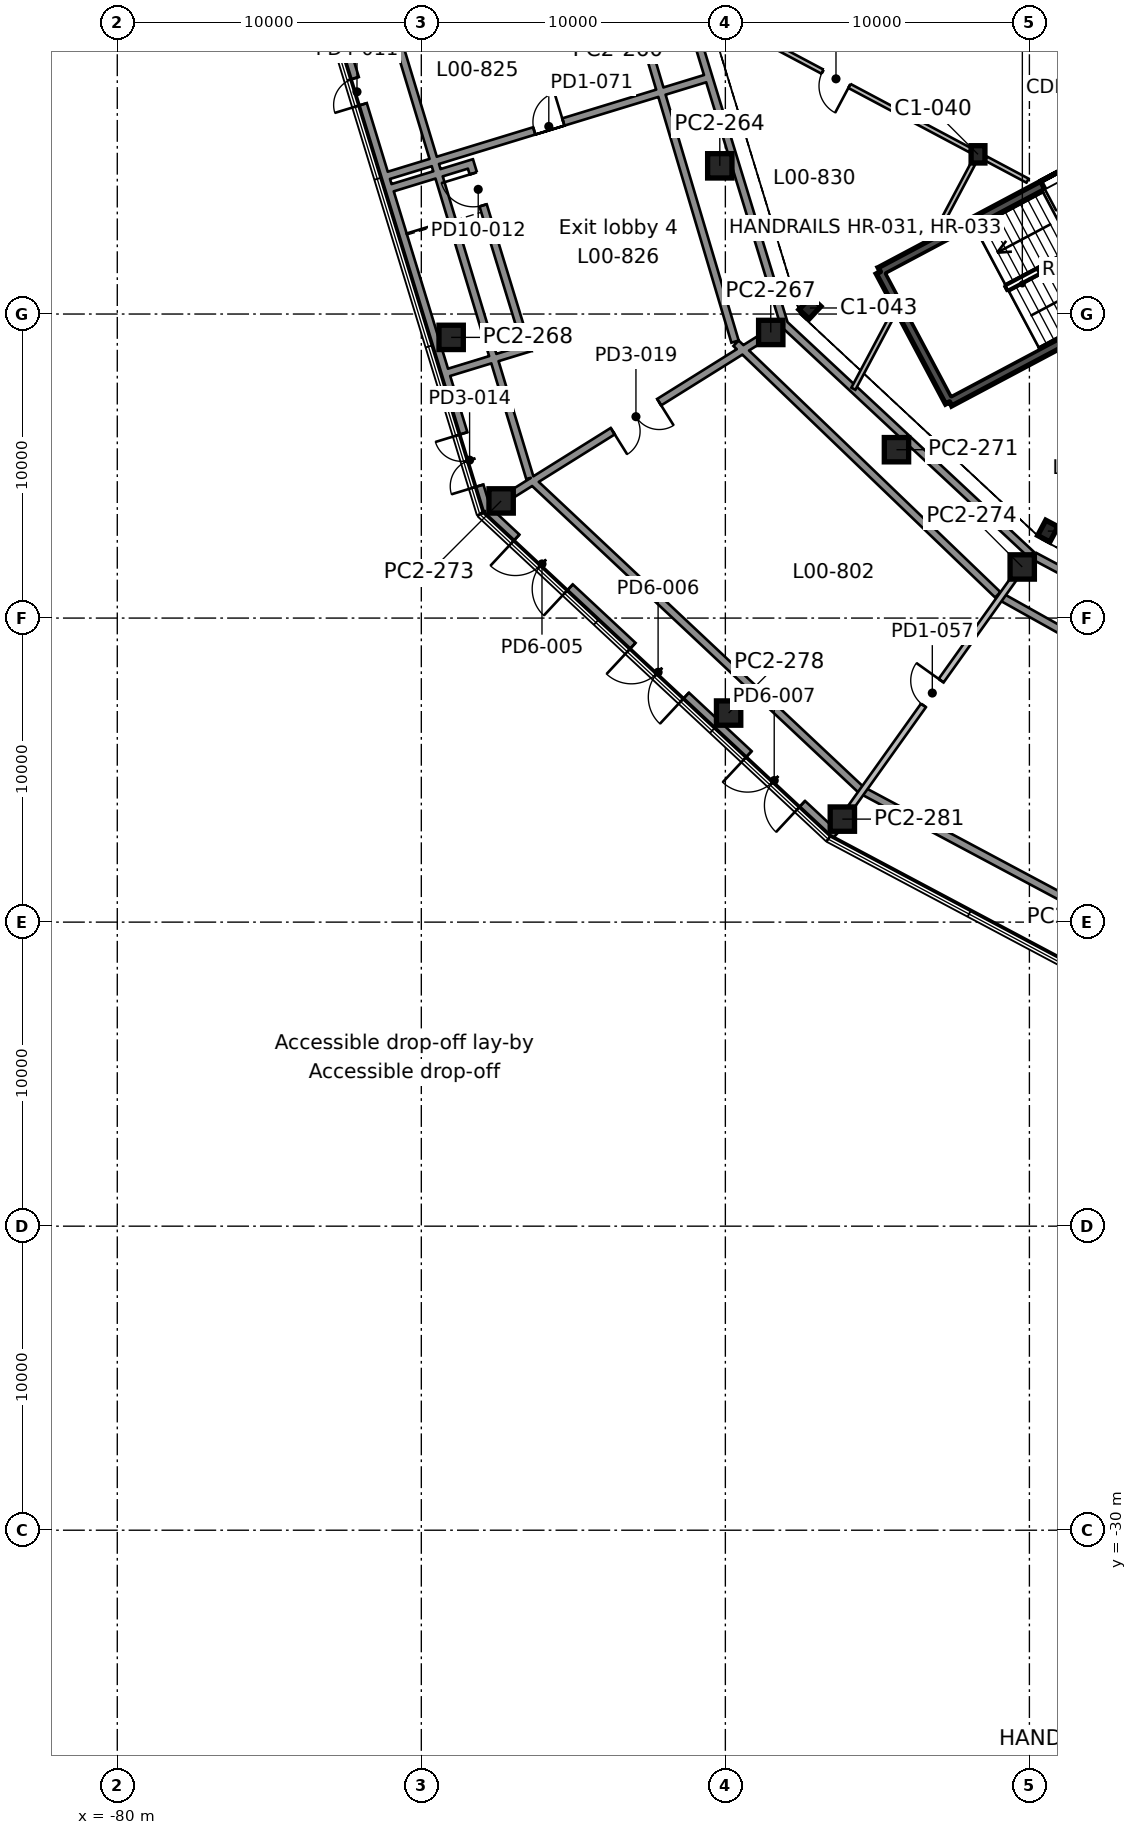
"""IFC4 building model, lengths in metres.
Left out: names, types, materials, properties, quantities, classifications, styles, units other than length and angle.
Written with IfcOpenShell. Run it as: python <this file> out.ifc"""

import sys

from ifc_helpers import new_model, si_unit, direction, frame, frame_2d, origin, origin_2d, place, context, subcontext, project, spatial, rectangle, i_section, extrude, element, fill, save


model = new_model("IFC4")
c1 = context("Model", 3, precision=1e-05, world=origin(), true_north=direction((0.0, 1.0)))
c2 = subcontext(c1, "Body", "Model", "MODEL_VIEW")
j1 = project(units=[si_unit("LENGTHUNIT", "METRE"), si_unit("PLANEANGLEUNIT", "RADIAN")], contexts=[c1])
p1 = place(None, origin())
s1 = spatial("IfcSite", under=j1, at=p1, CompositionType="ELEMENT")
p2 = place(p1, origin())
s2 = spatial("IfcBuilding", under=s1, at=p2, CompositionType="ELEMENT")
p3 = place(p2, origin())
s3 = spatial("IfcBuildingStorey", under=s2, at=p3, CompositionType="ELEMENT", Elevation=0.0)
for number, where, z_axis, x_axis in (
    (1, (-49.394, 2.861, 0.0), (0.0, 0.0, 1.0), (0.883, -0.469, 0.0)),
    (2, (-57.219, 10.199, 0.0), (0.0, 0.0, 1.0), (0.731, -0.682, 0.0)),
    (3, (-51.69, 15.252, 0.0), (0.0, 0.0, 1.0), (1.0, 0.0, 0.0)),
):
    element("IfcColumn", number, at=place(p3, frame(where, z_axis=z_axis, x_axis=x_axis)), inside=s3, PredefinedType="COLUMN", context=c2, shape_type="SweptSolid", body=[
        extrude(i_section(OverallWidth=0.455, OverallDepth=0.569, WebThickness=0.078, FlangeThickness=0.125, FilletRadius=0.015, at=origin_2d()), origin(), (0.0, 0.0, 1.0), 7.0),
    ])
p4 = place(p3, frame((-45.297, 11.007, 0.0), z_axis=(0.0, 0.0, 1.0), x_axis=(-0.882951519127, -0.469464178475, 0.0)))
e4 = element("IfcWall", 4, at=p4, inside=s3, PredefinedType="SHEAR", context=c2, shape_type="SweptSolid", body=[
    extrude(rectangle(XDim=8.3, YDim=0.3, at=frame_2d((4.15, 0.0))), origin(), (0.0, 0.0, 1.0), 7.0),
])
p5 = place(p3, frame((-52.626, 7.111, 0.0), z_axis=(0.0, 0.0, 1.0), x_axis=(-0.469464364128, 0.882951420416, 0.0)))
e5 = element("IfcWall", 5, at=p5, inside=s3, PredefinedType="SHEAR", context=c2, shape_type="SweptSolid", body=[
    extrude(rectangle(XDim=4.85, YDim=0.3, at=frame_2d((2.425, 0.0))), origin(), (0.0, 0.0, 1.0), 7.0),
])
p6 = place(p3, frame((-54.903, 11.393, 0.0), z_axis=(0.0, 0.0, 1.0), x_axis=(0.882939326045, 0.469487110071, 0.0)))
e6 = element("IfcWall", 6, at=p6, inside=s3, PredefinedType="SHEAR", context=c2, shape_type="SweptSolid", body=[
    extrude(rectangle(XDim=8.3, YDim=0.3, at=frame_2d((4.15, 0.0))), origin(), (0.0, 0.0, 1.0), 7.0),
])
p7 = place(p6, frame((6.05, 0.0, 0.0)))
e7 = element("IfcOpeningElement", 7, at=p7, cuts=e6, PredefinedType="OPENING", context=c2, shape_type="SweptSolid", body=[
    extrude(rectangle(XDim=1.9, YDim=2.1, at=frame_2d((0.95, 1.05))), frame((0.0, 0.16, 0.0), z_axis=(0.0, -1.0, 0.0), x_axis=(1.0, 0.0, 0.0)), (0.0, 0.0, 1.0), 0.32),
])
for number, where, z_axis, x_axis in (
    (8, (-56.152, -6.612, 0.0), (0.0, 0.0, 1.0), (1.0, 0.0, 0.0)),
    (9, (-59.893, -3.124, 0.0), (0.0, 0.0, 1.0), (1.0, 0.0, 0.0)),
    (10, (-50.236, 1.681, 0.0), (0.0, 0.0, 1.0), (1.0, 0.0, 0.0)),
    (11, (-67.375, 3.853, 0.0), (0.0, 0.0, 1.0), (1.0, 0.0, 0.0)),
    (12, (-54.372, 5.538, 0.0), (0.0, 0.0, 1.0), (1.0, 0.0, 0.0)),
    (13, (-69.019, 9.232, 0.0), (0.0, 0.0, 1.0), (1.0, 0.0, 0.0)),
    (14, (-58.507, 9.394, 0.0), (0.0, 0.0, 1.0), (1.0, 0.0, 0.0)),
    (15, (-60.183, 14.874, 0.0), (0.0, 0.0, 1.0), (1.0, 0.0, 0.0)),
):
    element("IfcColumn", number, at=place(p3, frame(where, z_axis=z_axis, x_axis=x_axis)), inside=s3, PredefinedType="COLUMN", context=c2, shape_type="SweptSolid", body=[
        extrude(rectangle(XDim=0.8, YDim=0.8, at=origin_2d()), origin(), (0.0, 0.0, 1.0), 6.37),
    ])
p8 = place(p3, frame((-72.929, 19.967, 0.0), z_axis=(0.0, 0.0, 1.0), x_axis=(0.292376176059, -0.956303388927, 0.0)))
e16 = element("IfcWall", 16, at=p8, inside=s3, PredefinedType="SOLIDWALL", context=c2, shape_type="SweptSolid", body=[
    extrude(rectangle(XDim=17.194, YDim=0.4, at=frame_2d((8.597, 0.0))), origin(), (0.0, 0.0, 1.0), 6.37),
])
p9 = place(p8, frame((2.33, 0.0, 0.0)))
e17 = element("IfcOpeningElement", 17, at=p9, cuts=e16, PredefinedType="OPENING", context=c2, shape_type="SweptSolid", body=[
    extrude(rectangle(XDim=0.9, YDim=2.1, at=frame_2d((0.45, 1.05))), frame((0.0, 0.21, 0.0), z_axis=(0.0, -1.0, 0.0), x_axis=(1.0, 0.0, 0.0)), (0.0, 0.0, 1.0), 0.42),
])
p10 = place(p8, frame((14.548, 0.0, 0.0)))
e18 = element("IfcOpeningElement", 18, at=p10, cuts=e16, PredefinedType="OPENING", context=c2, shape_type="SweptSolid", body=[
    extrude(rectangle(XDim=1.8, YDim=2.1, at=frame_2d((0.9, 1.05))), frame((0.0, 0.21, 0.0), z_axis=(0.0, -1.0, 0.0), x_axis=(1.0, 0.0, 0.0)), (0.0, 0.0, 1.0), 0.42),
])
p11 = place(p3, frame((-67.902, 3.524, 0.0), z_axis=(0.0, 0.0, 1.0), x_axis=(0.731345713801, -0.682006925848, 0.0)))
e19 = element("IfcWall", 19, at=p11, inside=s3, PredefinedType="SOLIDWALL", context=c2, shape_type="SweptSolid", body=[
    extrude(rectangle(XDim=15.706, YDim=0.4, at=frame_2d((7.853, 0.0))), origin(), (0.0, 0.0, 1.0), 6.37),
])
p12 = place(p11, frame((1.357, 0.0, 0.0)))
e20 = element("IfcOpeningElement", 20, at=p12, cuts=e19, PredefinedType="OPENING", context=c2, shape_type="SweptSolid", body=[
    extrude(rectangle(XDim=2.4, YDim=2.4, at=frame_2d((1.2, 1.2))), frame((0.0, 0.21, 0.0), z_axis=(0.0, -1.0, 0.0), x_axis=(1.0, 0.0, 0.0)), (0.0, 0.0, 1.0), 0.42),
])
p13 = place(p11, frame((6.579, 0.0, 0.0)))
e21 = element("IfcOpeningElement", 21, at=p13, cuts=e19, PredefinedType="OPENING", context=c2, shape_type="SweptSolid", body=[
    extrude(rectangle(XDim=2.4, YDim=2.4, at=frame_2d((1.2, 1.2))), frame((0.0, 0.21, 0.0), z_axis=(0.0, -1.0, 0.0), x_axis=(1.0, 0.0, 0.0)), (0.0, 0.0, 1.0), 0.42),
])
p14 = place(p11, frame((11.801, 0.0, 0.0)))
e22 = element("IfcOpeningElement", 22, at=p14, cuts=e19, PredefinedType="OPENING", context=c2, shape_type="SweptSolid", body=[
    extrude(rectangle(XDim=2.4, YDim=2.4, at=frame_2d((1.2, 1.2))), frame((0.0, 0.21, 0.0), z_axis=(0.0, -1.0, 0.0), x_axis=(1.0, 0.0, 0.0)), (0.0, 0.0, 1.0), 0.42),
])
p15 = place(p3, frame((-48.784, -9.255, 7.0), z_axis=(0.0, 0.0, 1.0), x_axis=(-0.882115498976, 0.471033169178, 0.0)))
e23 = element("IfcWall", 23, at=p15, inside=s3, PredefinedType="STANDARD", context=c2, shape_type="SweptSolid", body=[
    extrude(rectangle(XDim=7.632, YDim=0.25, at=frame_2d((3.816, 0.0))), origin(), (0.0, 0.0, 1.0), 0.65),
])
p16 = place(p3, frame((-55.543, -5.642, 7.0), z_axis=(0.0, 0.0, 1.0), x_axis=(-0.728908334125, 0.684611306102, 0.0)))
e24 = element("IfcWall", 24, at=p16, inside=s3, PredefinedType="STANDARD", context=c2, shape_type="SweptSolid", body=[
    extrude(rectangle(XDim=14.886, YDim=0.25, at=frame_2d((7.443, 0.0))), origin(), (0.0, 0.0, 1.0), 0.65),
])
p17 = place(p3, frame((-66.428, 4.605, 7.0), z_axis=(0.0, 0.0, 1.0), x_axis=(-0.289217899345, 0.957263290166, 0.0)))
e25 = element("IfcWall", 25, at=p17, inside=s3, PredefinedType="STANDARD", context=c2, shape_type="SweptSolid", body=[
    extrude(rectangle(XDim=16.189, YDim=0.25, at=frame_2d((8.094, 0.0))), origin(), (0.0, 0.0, 1.0), 0.65),
])
p18 = place(p3, frame((-63.039, 20.385, 7.0), z_axis=(0.0, 0.0, 1.0), x_axis=(0.284972326549, -0.9585357443, 0.0)))
e26 = element("IfcWall", 26, at=p18, inside=s3, PredefinedType="STANDARD", context=c2, shape_type="SweptSolid", body=[
    extrude(rectangle(XDim=11.781, YDim=0.25, at=frame_2d((5.89, 0.0))), origin(), (0.0, 0.0, 1.0), 0.65),
])
p19 = place(p3, frame((-59.649, 9.039, 7.0), z_axis=(0.0, 0.0, 1.0), x_axis=(0.721064848091, -0.692867581034, 0.0)))
e27 = element("IfcWall", 27, at=p19, inside=s3, PredefinedType="STANDARD", context=c2, shape_type="SweptSolid", body=[
    extrude(rectangle(XDim=11.94, YDim=0.25, at=frame_2d((5.97, 0.0))), origin(), (0.0, 0.0, 1.0), 0.65),
])
p20 = place(p3, frame((-51.014, 0.747, 7.0), z_axis=(0.0, 0.0, 1.0), x_axis=(0.872584878438, -0.488462516394, 0.0)))
e28 = element("IfcWall", 28, at=p20, inside=s3, PredefinedType="STANDARD", context=c2, shape_type="SweptSolid", body=[
    extrude(rectangle(XDim=6.809, YDim=0.25, at=frame_2d((3.405, 0.0))), origin(), (0.0, 0.0, 1.0), 0.65),
])
p21 = place(p3, frame((-71.067, 14.562, 0.0), z_axis=(0.0, 0.0, 1.0), x_axis=(0.956304866869, 0.292371341965, 0.0)))
e29 = element("IfcWall", 29, at=p21, inside=s3, PredefinedType="SOLIDWALL", context=c2, shape_type="SweptSolid", body=[
    extrude(rectangle(XDim=11.0, YDim=0.25, at=frame_2d((5.5, 0.0))), origin(), (0.0, 0.0, 1.0), 6.37),
])
p22 = place(p21, frame((5.0, 0.0, 0.0)))
e30 = element("IfcOpeningElement", 30, at=p22, cuts=e29, PredefinedType="OPENING", context=c2, shape_type="SweptSolid", body=[
    extrude(rectangle(XDim=1.0, YDim=2.1, at=frame_2d((0.5, 1.05))), frame((0.0, 0.135, 0.0), z_axis=(0.0, -1.0, 0.0), x_axis=(1.0, 0.0, 0.0)), (0.0, 0.0, 1.0), 0.27),
])
p23 = place(p3, frame((-60.549, 17.783, 0.0), z_axis=(0.0, 0.0, 1.0), x_axis=(-0.291634808329, 0.956529737421, 0.0)))
e31 = element("IfcWall", 31, at=p23, inside=s3, PredefinedType="SOLIDWALL", context=c2, shape_type="SweptSolid", body=[
    extrude(rectangle(XDim=2.71, YDim=0.25, at=frame_2d((1.355, 0.0))), origin(), (0.0, 0.0, 1.0), 6.37),
])
p24 = place(p3, frame((-58.065, 9.666, 0.0), z_axis=(0.0, 0.0, 1.0), x_axis=(-0.292613894095, 0.956230677704, 0.0)))
e32 = element("IfcWall", 32, at=p24, inside=s3, PredefinedType="SOLIDWALL", context=c2, shape_type="SweptSolid", body=[
    extrude(rectangle(XDim=8.487, YDim=0.25, at=frame_2d((4.244, 0.0))), origin(), (0.0, 0.0, 1.0), 6.37),
])
p25 = place(p3, frame((-66.975, 4.103, 0.0), z_axis=(0.0, 0.0, 1.0), x_axis=(0.848048758951, 0.529918203539, 0.0)))
e33 = element("IfcWall", 33, at=p25, inside=s3, PredefinedType="SOLIDWALL", context=c2, shape_type="SweptSolid", body=[
    extrude(rectangle(XDim=9.514, YDim=0.25, at=frame_2d((4.757, 0.0))), origin(), (0.0, 0.0, 1.0), 6.37),
])
p26 = place(p25, frame((3.857, 0.0, 0.0)))
e34 = element("IfcOpeningElement", 34, at=p26, cuts=e33, PredefinedType="OPENING", context=c2, shape_type="SweptSolid", body=[
    extrude(rectangle(XDim=1.8, YDim=2.1, at=frame_2d((0.9, 1.05))), frame((0.0, 0.135, 0.0), z_axis=(0.0, -1.0, 0.0), x_axis=(1.0, 0.0, 0.0)), (0.0, 0.0, 1.0), 0.27),
])
p27 = place(p3, frame((-47.224, 0.646, 0.0), z_axis=(0.0, 0.0, 1.0), x_axis=(-0.882766080441, 0.469812778905, 0.0)))
e35 = element("IfcWall", 35, at=p27, inside=s3, PredefinedType="SOLIDWALL", context=c2, shape_type="SweptSolid", body=[
    extrude(rectangle(XDim=2.958, YDim=0.25, at=frame_2d((1.479, 0.0))), origin(), (0.0, 0.0, 1.0), 6.37),
])
p28 = place(p3, frame((-50.521, 1.281, 0.0), z_axis=(0.0, 0.0, 1.0), x_axis=(-0.580708624763, -0.814111474631, 0.0)))
e36 = element("IfcWall", 36, at=p28, inside=s3, PredefinedType="PARTITIONING", context=c2, shape_type="SweptSolid", body=[
    extrude(rectangle(XDim=9.204, YDim=0.2, at=frame_2d((4.602, 0.0))), origin(), (0.0, 0.0, 1.0), 6.37),
])
p29 = place(p28, frame((4.102, 0.0, 0.0)))
e37 = element("IfcOpeningElement", 37, at=p29, cuts=e36, PredefinedType="OPENING", context=c2, shape_type="SweptSolid", body=[
    extrude(rectangle(XDim=1.0, YDim=2.1, at=frame_2d((0.5, 1.05))), frame((0.0, 0.11, 0.0), z_axis=(0.0, -1.0, 0.0), x_axis=(1.0, 0.0, 0.0)), (0.0, 0.0, 1.0), 0.22),
])
p30 = place(p3, frame((-51.427, 15.113, 0.0), z_axis=(0.0, 0.0, 1.0), x_axis=(0.882911356804, -0.469539706549, 0.0)))
e38 = element("IfcWall", 38, at=p30, inside=s3, PredefinedType="PARTITIONING", context=c2, shape_type="SweptSolid", body=[
    extrude(rectangle(XDim=1.547, YDim=0.15, at=frame_2d((0.774, 0.0))), origin(), (0.0, 0.0, 1.0), 6.55),
])
p31 = place(p3, frame((-60.632, 20.007, 0.0), z_axis=(0.0, 0.0, 1.0), x_axis=(0.882940733586, -0.469484462975, 0.0)))
e39 = element("IfcWall", 39, at=p31, inside=s3, PredefinedType="PARTITIONING", context=c2, shape_type="SweptSolid", body=[
    extrude(rectangle(XDim=9.83, YDim=0.15, at=frame_2d((4.915, 0.0))), origin(), (0.0, 0.0, 1.0), 6.55),
])
p32 = place(p31, frame((4.337, 0.0, 0.0)))
e40 = element("IfcOpeningElement", 40, at=p32, cuts=e39, PredefinedType="OPENING", context=c2, shape_type="SweptSolid", body=[
    extrude(rectangle(XDim=1.0, YDim=2.1, at=frame_2d((0.5, 1.05))), frame((0.0, 0.085, 0.0), z_axis=(0.0, -1.0, 0.0), x_axis=(1.0, 0.0, 0.0)), (0.0, 0.0, 1.0), 0.17),
])
p33 = place(p3, frame((-51.858, 14.936, 0.0), z_axis=(0.0, 0.0, 1.0), x_axis=(-0.469439381141, -0.882964703391, 0.0)))
e41 = element("IfcWall", 41, at=p33, inside=s3, PredefinedType="PARTITIONING", context=c2, shape_type="SweptSolid", body=[
    extrude(rectangle(XDim=2.659, YDim=0.15, at=frame_2d((1.33, 0.0))), origin(), (0.0, 0.0, 1.0), 6.55),
])
p34 = place(p3, frame((-54.431, 10.097, 0.0), z_axis=(0.0, 0.0, 1.0), x_axis=(-0.46949257756, -0.882936418784, 0.0)))
e42 = element("IfcWall", 42, at=p34, inside=s3, PredefinedType="PARTITIONING", context=c2, shape_type="SweptSolid", body=[
    extrude(rectangle(XDim=2.892, YDim=0.15, at=frame_2d((1.446, 0.0))), origin(), (0.0, 0.0, 1.0), 6.55),
])
p35 = place(p3, frame((-55.785, 7.539, 0.0), z_axis=(0.0, 0.0, 1.0), x_axis=(0.731373339026, -0.681977300914, 0.0)))
e43 = element("IfcWall", 43, at=p35, inside=s3, PredefinedType="SOLIDWALL", context=c2, shape_type="SweptSolid", body=[
    extrude(rectangle(XDim=2.348, YDim=0.25, at=frame_2d((1.174, 0.0))), origin(), (0.0, 0.0, 1.0), 6.37),
])
p36 = place(p3, frame((-53.972, 5.849, 0.0), z_axis=(0.0, 0.0, 1.0), x_axis=(0.731317536597, -0.682037140239, 0.0)))
e44 = element("IfcWall", 44, at=p36, inside=s3, PredefinedType="SOLIDWALL", context=c2, shape_type="SweptSolid", body=[
    extrude(rectangle(XDim=5.509, YDim=0.25, at=frame_2d((2.754, 0.0))), origin(), (0.0, 0.0, 1.0), 6.37),
])
p37 = place(p3, frame((-58.068, 9.669, 0.0), z_axis=(0.0, 0.0, 1.0), x_axis=(0.731356961262, -0.681994864507, 0.0)))
e45 = element("IfcWall", 45, at=p37, inside=s3, PredefinedType="SOLIDWALL", context=c2, shape_type="SweptSolid", body=[
    extrude(rectangle(XDim=3.121, YDim=0.25, at=frame_2d((1.561, 0.0))), origin(), (0.0, 0.0, 1.0), 6.37),
])
for number, where, z_axis, x_axis in (
    (46, (-70.943, 14.155, 0.0), (0.0, 0.0, 1.0), (0.956, 0.292, 0.0)),
    (47, (-69.086, 8.083, 0.0), (0.0, 0.0, 1.0), (0.956, 0.292, 0.0)),
):
    element("IfcWall", number, at=place(p3, frame(where, z_axis=z_axis, x_axis=x_axis)), inside=s3, PredefinedType="SOLIDWALL", context=c2, shape_type="SweptSolid", body=[
        extrude(rectangle(XDim=2.8, YDim=0.25, at=frame_2d((1.4, 0.0))), origin(), (0.0, 0.0, 1.0), 6.37),
    ])
p38 = place(p3, frame((-68.421, 15.057, 0.0), z_axis=(0.0, 0.0, 1.0), x_axis=(0.292369833763, -0.956305327971, 0.0)))
e48 = element("IfcWall", 48, at=p38, inside=s3, PredefinedType="SOLIDWALL", context=c2, shape_type="SweptSolid", body=[
    extrude(rectangle(XDim=6.6, YDim=0.25, at=frame_2d((3.3, 0.0))), origin(), (0.0, 0.0, 1.0), 6.37),
])
p39 = place(p38, frame((0.45, 0.0, 0.0)))
e49 = element("IfcOpeningElement", 49, at=p39, cuts=e48, PredefinedType="OPENING", context=c2, shape_type="SweptSolid", body=[
    extrude(rectangle(XDim=1.1, YDim=2.1, at=frame_2d((0.55, 1.05))), frame((0.0, 0.135, 0.0), z_axis=(0.0, -1.0, 0.0), x_axis=(1.0, 0.0, 0.0)), (0.0, 0.0, 1.0), 0.27),
])
p40 = place(p7, frame((1.9, 0.0, 0.0), z_axis=(0.0, 0.0, 1.0), x_axis=(-1.0, 0.0, 0.0)))
e50 = element("IfcDoor", 50, at=p40, inside=s3, OperationType="DOUBLE_DOOR_SINGLE_SWING", PredefinedType="DOOR", context=c2, shape_type="SweptSolid", body=[
    extrude(rectangle(XDim=1.9, YDim=2.1, at=frame_2d((0.95, 1.05))), frame((0.0, 0.025, 0.0), z_axis=(0.0, -1.0, 0.0), x_axis=(1.0, 0.0, 0.0)), (0.0, 0.0, 1.0), 0.05),
])
fill(e7, e50)
p41 = place(p9, frame((0.9, 0.0, 0.0), z_axis=(0.0, 0.0, 1.0), x_axis=(-1.0, 0.0, 0.0)))
e51 = element("IfcDoor", 51, at=p41, inside=s3, OperationType="SINGLE_SWING_LEFT", PredefinedType="DOOR", context=c2, shape_type="SweptSolid", body=[
    extrude(rectangle(XDim=0.9, YDim=2.1, at=frame_2d((0.45, 1.05))), frame((0.0, 0.025, 0.0), z_axis=(0.0, -1.0, 0.0), x_axis=(1.0, 0.0, 0.0)), (0.0, 0.0, 1.0), 0.05),
])
fill(e17, e51)
p42 = place(p10, frame((1.8, 0.0, 0.0), z_axis=(0.0, 0.0, 1.0), x_axis=(-1.0, 0.0, 0.0)))
e52 = element("IfcDoor", 52, at=p42, inside=s3, OperationType="DOUBLE_DOOR_SINGLE_SWING", PredefinedType="DOOR", context=c2, shape_type="SweptSolid", body=[
    extrude(rectangle(XDim=1.8, YDim=2.1, at=frame_2d((0.9, 1.05))), frame((0.0, 0.025, 0.0), z_axis=(0.0, -1.0, 0.0), x_axis=(1.0, 0.0, 0.0)), (0.0, 0.0, 1.0), 0.05),
])
fill(e18, e52)
p43 = place(p12, frame((2.4, 0.0, 0.0), z_axis=(0.0, 0.0, 1.0), x_axis=(-1.0, 0.0, 0.0)))
e53 = element("IfcDoor", 53, at=p43, inside=s3, OperationType="DOUBLE_DOOR_SINGLE_SWING", PredefinedType="DOOR", context=c2, shape_type="SweptSolid", body=[
    extrude(rectangle(XDim=2.4, YDim=2.4, at=frame_2d((1.2, 1.2))), frame((0.0, 0.025, 0.0), z_axis=(0.0, -1.0, 0.0), x_axis=(1.0, 0.0, 0.0)), (0.0, 0.0, 1.0), 0.05),
])
fill(e20, e53)
p44 = place(p13, frame((2.4, 0.0, 0.0), z_axis=(0.0, 0.0, 1.0), x_axis=(-1.0, 0.0, 0.0)))
e54 = element("IfcDoor", 54, at=p44, inside=s3, OperationType="DOUBLE_DOOR_SINGLE_SWING", PredefinedType="DOOR", context=c2, shape_type="SweptSolid", body=[
    extrude(rectangle(XDim=2.4, YDim=2.4, at=frame_2d((1.2, 1.2))), frame((0.0, 0.025, 0.0), z_axis=(0.0, -1.0, 0.0), x_axis=(1.0, 0.0, 0.0)), (0.0, 0.0, 1.0), 0.05),
])
fill(e21, e54)
p45 = place(p14, frame((2.4, 0.0, 0.0), z_axis=(0.0, 0.0, 1.0), x_axis=(-1.0, 0.0, 0.0)))
e55 = element("IfcDoor", 55, at=p45, inside=s3, OperationType="DOUBLE_DOOR_SINGLE_SWING", PredefinedType="DOOR", context=c2, shape_type="SweptSolid", body=[
    extrude(rectangle(XDim=2.4, YDim=2.4, at=frame_2d((1.2, 1.2))), frame((0.0, 0.025, 0.0), z_axis=(0.0, -1.0, 0.0), x_axis=(1.0, 0.0, 0.0)), (0.0, 0.0, 1.0), 0.05),
])
fill(e22, e55)
p46 = place(p39, frame((1.1, 0.0, 0.0), z_axis=(0.0, 0.0, 1.0), x_axis=(-1.0, 0.0, 0.0)))
e56 = element("IfcDoor", 56, at=p46, inside=s3, OperationType="SINGLE_SWING_RIGHT", PredefinedType="DOOR", context=c2, shape_type="SweptSolid", body=[
    extrude(rectangle(XDim=1.1, YDim=2.1, at=frame_2d((0.55, 1.05))), frame((0.0, 0.025, 0.0), z_axis=(0.0, -1.0, 0.0), x_axis=(1.0, 0.0, 0.0)), (0.0, 0.0, 1.0), 0.05),
])
fill(e49, e56)
p47 = place(p32, frame((1.0, 0.0, 0.0), z_axis=(0.0, 0.0, 1.0), x_axis=(-1.0, 0.0, 0.0)))
e57 = element("IfcDoor", 57, at=p47, inside=s3, OperationType="SINGLE_SWING_LEFT", PredefinedType="DOOR", context=c2, shape_type="SweptSolid", body=[
    extrude(rectangle(XDim=1.0, YDim=2.1, at=frame_2d((0.5, 1.05))), frame((0.0, 0.025, 0.0), z_axis=(0.0, -1.0, 0.0), x_axis=(1.0, 0.0, 0.0)), (0.0, 0.0, 1.0), 0.05),
])
fill(e40, e57)
p48 = place(p26, frame((1.8, 0.0, 0.0), z_axis=(0.0, 0.0, 1.0), x_axis=(-1.0, 0.0, 0.0)))
e58 = element("IfcDoor", 58, at=p48, inside=s3, OperationType="DOUBLE_DOOR_SINGLE_SWING", PredefinedType="DOOR", context=c2, shape_type="SweptSolid", body=[
    extrude(rectangle(XDim=1.8, YDim=2.1, at=frame_2d((0.9, 1.05))), frame((0.0, 0.025, 0.0), z_axis=(0.0, -1.0, 0.0), x_axis=(1.0, 0.0, 0.0)), (0.0, 0.0, 1.0), 0.05),
])
fill(e34, e58)
p49 = place(p29, frame((1.0, 0.0, 0.0), z_axis=(0.0, 0.0, 1.0), x_axis=(-1.0, 0.0, 0.0)))
e59 = element("IfcDoor", 59, at=p49, inside=s3, OperationType="SINGLE_SWING_RIGHT", PredefinedType="DOOR", context=c2, shape_type="SweptSolid", body=[
    extrude(rectangle(XDim=1.0, YDim=2.1, at=frame_2d((0.5, 1.05))), frame((0.0, 0.025, 0.0), z_axis=(0.0, -1.0, 0.0), x_axis=(1.0, 0.0, 0.0)), (0.0, 0.0, 1.0), 0.05),
])
fill(e37, e59)
p50 = place(p22, origin())
e60 = element("IfcDoor", 60, at=p50, inside=s3, OperationType="SINGLE_SWING_RIGHT", PredefinedType="DOOR", context=c2, shape_type="SweptSolid", body=[
    extrude(rectangle(XDim=1.0, YDim=2.1, at=frame_2d((0.5, 1.05))), frame((0.0, 0.025, 0.0), z_axis=(0.0, -1.0, 0.0), x_axis=(1.0, 0.0, 0.0)), (0.0, 0.0, 1.0), 0.05),
])
fill(e30, e60)
save(model, sys.argv[1])
